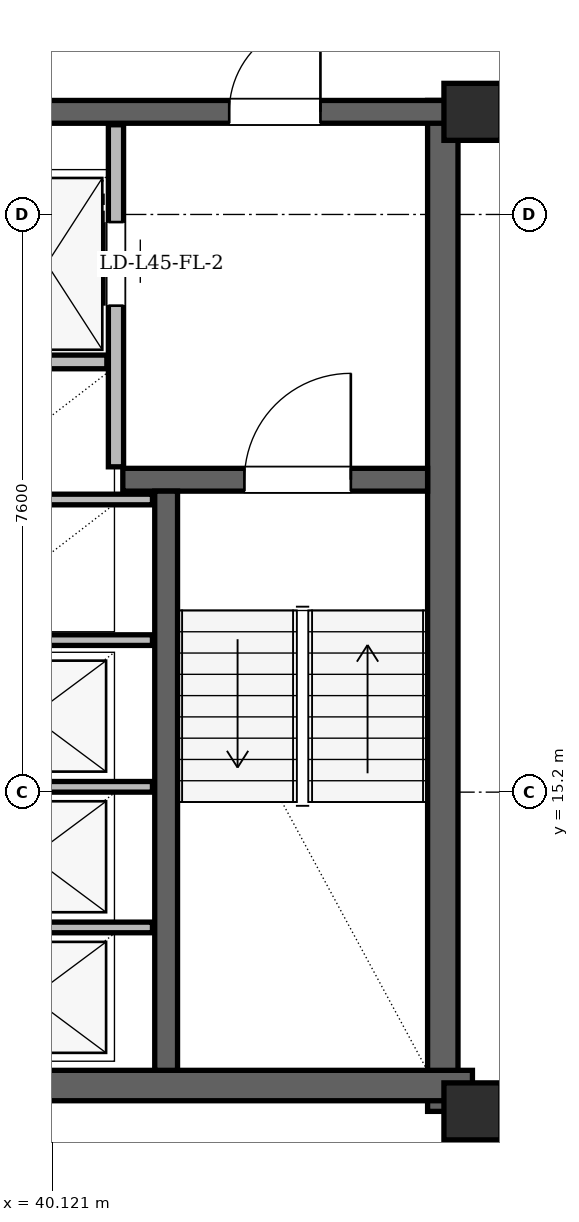
"""IFC4 building model, lengths in metres.
Left out: names, types, materials, properties, quantities, classifications, styles, units other than length and angle.
Written with IfcOpenShell. Run it as: python <this file> out.ifc"""

import sys

from ifc_helpers import new_model, si_unit, direction, frame, frame_2d, origin, origin_2d, place, context, subcontext, project, spatial, rectangle, hollow_rectangle, extrude, element, fill, save


model = new_model("IFC4")
c1 = context("Model", 3, precision=1e-05, world=origin(), true_north=direction((0.0, 1.0)))
c2 = subcontext(c1, "Body", "Model", "MODEL_VIEW")
j1 = project(units=[si_unit("LENGTHUNIT", "METRE"), si_unit("PLANEANGLEUNIT", "RADIAN")], contexts=[c1])
p1 = place(None, origin())
s1 = spatial("IfcSite", under=j1, at=p1, CompositionType="ELEMENT")
p2 = place(p1, origin())
s2 = spatial("IfcBuilding", under=s1, at=p2, CompositionType="ELEMENT")
p3 = place(p2, frame((0.0, 0.0, 171.0)))
s3 = spatial("IfcBuildingStorey", under=s2, at=p3, CompositionType="ELEMENT", Elevation=171.0)
for number, where, z_axis, x_axis in (
    (1, (45.65, 11.0, 0.0), (0.0, 0.0, 1.0), (1.0, 0.0, 0.0)),
    (2, (45.65, 24.15, 0.0), (0.0, 0.0, 1.0), (1.0, 0.0, 0.0)),
):
    element("IfcColumn", number, at=place(p3, frame(where, z_axis=z_axis, x_axis=x_axis)), inside=s3, PredefinedType="COLUMN", context=c2, shape_type="SweptSolid", body=[
        extrude(hollow_rectangle(XDim=0.75, YDim=0.75, WallThickness=0.06, at=origin_2d()), origin(), (0.0, 0.0, 1.0), 3.6),
    ])
p4 = place(p3, frame((45.26, 11.0, 0.0), z_axis=(0.0, 0.0, 1.0), x_axis=(0.0, 1.0, 0.0)))
e3 = element("IfcWall", 3, at=p4, inside=s3, PredefinedType="SHEAR", context=c2, shape_type="SweptSolid", body=[
    extrude(rectangle(XDim=13.3, YDim=0.4, at=frame_2d((6.65, 0.0))), origin(), (0.0, 0.0, 1.0), 3.38),
])
p5 = place(p3, frame((38.55, 11.34, 0.0), z_axis=(0.0, 0.0, 1.0), x_axis=(1.0, 0.0, 0.0)))
e4 = element("IfcWall", 4, at=p5, inside=s3, PredefinedType="SHEAR", context=c2, shape_type="SweptSolid", body=[
    extrude(rectangle(XDim=7.1, YDim=0.4, at=frame_2d((3.55, 0.0))), origin(), (0.0, 0.0, 1.0), 3.38),
])
p6 = place(p3, frame((29.65, 24.15, 0.0), z_axis=(0.0, 0.0, 1.0), x_axis=(1.0, 0.0, 0.0)))
e5 = element("IfcWall", 5, at=p6, inside=s3, PredefinedType="SHEAR", context=c2, shape_type="SweptSolid", body=[
    extrude(rectangle(XDim=15.7, YDim=0.3, at=frame_2d((7.85, 0.0))), origin(), (0.0, 0.0, 1.0), 3.38),
])
p7 = place(p6, frame((1.7, 0.0, 0.0)))
e6 = element("IfcOpeningElement", 6, at=p7, cuts=e5, PredefinedType="OPENING", context=c2, shape_type="SweptSolid", body=[
    extrude(rectangle(XDim=1.2, YDim=2.2, at=frame_2d((0.6, 1.1))), frame((0.0, 0.15, 0.0), z_axis=(0.0, -1.0, 0.0), x_axis=(1.0, 0.0, 0.0)), (0.0, 0.0, 1.0), 0.3),
])
p8 = place(p6, frame((12.8, 0.0, 0.0)))
e7 = element("IfcOpeningElement", 7, at=p8, cuts=e5, PredefinedType="OPENING", context=c2, shape_type="SweptSolid", body=[
    extrude(rectangle(XDim=1.2, YDim=2.2, at=frame_2d((0.6, 1.1))), frame((0.0, 0.15, 0.0), z_axis=(0.0, -1.0, 0.0), x_axis=(1.0, 0.0, 0.0)), (0.0, 0.0, 1.0), 0.3),
])
p9 = place(p6, frame((7.4, 0.0, 0.0)))
e8 = element("IfcOpeningElement", 8, at=p9, cuts=e5, PredefinedType="OPENING", context=c2, shape_type="SweptSolid", body=[
    extrude(rectangle(XDim=0.9, YDim=2.05, at=frame_2d((0.45, 1.025))), frame((0.0, 0.15, 0.0), z_axis=(0.0, -1.0, 0.0), x_axis=(1.0, 0.0, 0.0)), (0.0, 0.0, 1.0), 0.3),
])
p10 = place(p3, frame((41.05, 19.31, 0.0), z_axis=(0.0, 0.0, 1.0), x_axis=(1.0, 0.0, 0.0)))
e9 = element("IfcWall", 9, at=p10, inside=s3, PredefinedType="SHEAR", context=c2, shape_type="SweptSolid", body=[
    extrude(rectangle(XDim=4.01, YDim=0.3, at=frame_2d((2.005, 0.0))), origin(), (0.0, 0.0, 1.0), 3.38),
])
p11 = place(p10, frame((1.6, 0.0, 0.0)))
e10 = element("IfcOpeningElement", 10, at=p11, cuts=e9, PredefinedType="OPENING", context=c2, shape_type="SweptSolid", body=[
    extrude(rectangle(XDim=1.4, YDim=2.2, at=frame_2d((0.7, 1.1))), frame((0.0, 0.15, 0.0), z_axis=(0.0, -1.0, 0.0), x_axis=(1.0, 0.0, 0.0)), (0.0, 0.0, 1.0), 0.3),
])
p12 = place(p3, frame((41.62, 11.54, 0.0), z_axis=(0.0, 0.0, 1.0), x_axis=(0.0, 1.0, 0.0)))
e11 = element("IfcWall", 11, at=p12, inside=s3, PredefinedType="SHEAR", context=c2, shape_type="SweptSolid", body=[
    extrude(rectangle(XDim=7.62, YDim=0.3, at=frame_2d((3.81, 0.0))), origin(), (0.0, 0.0, 1.0), 3.38),
])
p13 = place(p3, frame((59.708, 12.214, 0.0), z_axis=(0.0, 0.0, 1.0), x_axis=(-0.499997229411, 0.866027003379, 0.0)))
e12 = element("IfcWall", 12, at=p13, inside=s3, PredefinedType="SOLIDWALL", context=c2, shape_type="SweptSolid", body=[
    extrude(rectangle(XDim=35.866, YDim=0.29, at=frame_2d((17.933, 0.0))), origin(), (0.0, 0.0, 1.0), 2.6),
])
p14 = place(p13, frame((8.034, 0.0, 0.0)))
e13 = element("IfcOpeningElement", 13, at=p14, cuts=e12, PredefinedType="OPENING", context=c2, shape_type="SweptSolid", body=[
    extrude(rectangle(XDim=1.5, YDim=2.2, at=frame_2d((0.75, 1.1))), frame((0.0, 0.145, 0.0), z_axis=(0.0, -1.0, 0.0), x_axis=(1.0, 0.0, 0.0)), (0.0, 0.0, 1.0), 0.29),
])
p15 = place(p13, frame((27.787, 0.0, 0.0)))
e14 = element("IfcOpeningElement", 14, at=p15, cuts=e12, PredefinedType="OPENING", context=c2, shape_type="SweptSolid", body=[
    extrude(rectangle(XDim=1.5, YDim=2.2, at=frame_2d((0.75, 1.1))), frame((0.0, 0.145, 0.0), z_axis=(0.0, -1.0, 0.0), x_axis=(1.0, 0.0, 0.0)), (0.0, 0.0, 1.0), 0.29),
])
p16 = place(p13, frame((33.023, 0.0, 0.85)))
e15 = element("IfcOpeningElement", 15, at=p16, cuts=e12, PredefinedType="OPENING", context=c2, shape_type="SweptSolid", body=[
    extrude(rectangle(XDim=1.2, YDim=1.48, at=frame_2d((0.6, 0.74))), frame((0.0, 0.145, 0.0), z_axis=(0.0, -1.0, 0.0), x_axis=(1.0, 0.0, 0.0)), (0.0, 0.0, 1.0), 0.29),
])
p17 = place(p13, frame((15.917, 0.0, 0.85)))
e16 = element("IfcOpeningElement", 16, at=p17, cuts=e12, PredefinedType="OPENING", context=c2, shape_type="SweptSolid", body=[
    extrude(rectangle(XDim=1.4, YDim=1.6, at=frame_2d((0.7, 0.8))), frame((0.0, 0.145, 0.0), z_axis=(0.0, -1.0, 0.0), x_axis=(1.0, 0.0, 0.0)), (0.0, 0.0, 1.0), 0.29),
])
p18 = place(p13, frame((21.416, 0.0, 0.85)))
e17 = element("IfcOpeningElement", 17, at=p18, cuts=e12, PredefinedType="OPENING", context=c2, shape_type="SweptSolid", body=[
    extrude(rectangle(XDim=2.5, YDim=1.64, at=frame_2d((1.25, 0.82))), frame((0.0, 0.145, 0.0), z_axis=(0.0, -1.0, 0.0), x_axis=(1.0, 0.0, 0.0)), (0.0, 0.0, 1.0), 0.29),
])
p19 = place(p3, frame((40.96, 19.48, 0.0), z_axis=(0.0, 0.0, 1.0), x_axis=(0.0, 1.0, 0.0)))
e18 = element("IfcWall", 18, at=p19, inside=s3, PredefinedType="PARTITIONING", context=c2, shape_type="SweptSolid", body=[
    extrude(rectangle(XDim=4.5, YDim=0.2, at=frame_2d((2.25, 0.0))), origin(), (0.0, 0.0, 1.0), 3.38),
])
p20 = place(p19, frame((2.12, 0.0, 0.0)))
e19 = element("IfcOpeningElement", 19, at=p20, cuts=e18, PredefinedType="OPENING", context=c2, shape_type="SweptSolid", body=[
    extrude(rectangle(XDim=1.1, YDim=2.2, at=frame_2d((0.55, 1.1))), frame((0.0, 0.1, 0.0), z_axis=(0.0, -1.0, 0.0), x_axis=(1.0, 0.0, 0.0)), (0.0, 0.0, 1.0), 0.2),
])
p21 = place(p3, frame((39.26, 20.86, 0.0), z_axis=(0.0, 0.0, 1.0), x_axis=(1.0, 0.0, 0.0)))
e20 = element("IfcWall", 20, at=p21, inside=s3, PredefinedType="PARTITIONING", context=c2, shape_type="SweptSolid", body=[
    extrude(rectangle(XDim=1.58, YDim=0.18, at=frame_2d((0.79, 0.0))), origin(), (0.0, 0.0, 1.0), 3.38),
])
for number, where, z_axis, x_axis in (
    (21, (38.78, 13.42, 0.0), (0.0, 0.0, 1.0), (1.0, 0.0, 0.0)),
    (22, (38.78, 15.27, 0.0), (0.0, 0.0, 1.0), (1.0, 0.0, 0.0)),
    (23, (38.78, 17.2, 0.0), (0.0, 0.0, 1.0), (1.0, 0.0, 0.0)),
    (24, (38.78, 19.05, 0.0), (0.0, 0.0, 1.0), (1.0, 0.0, 0.0)),
):
    element("IfcWall", number, at=place(p3, frame(where, z_axis=z_axis, x_axis=x_axis)), inside=s3, PredefinedType="PARTITIONING", context=c2, shape_type="SweptSolid", body=[
        extrude(rectangle(XDim=2.66, YDim=0.14, at=frame_2d((1.33, 0.0))), origin(), (0.0, 0.0, 1.0), 3.38),
    ])
p22 = place(p20, origin())
e25 = element("IfcDoor", 25, at=p22, inside=s3, OperationType="SLIDING_TO_RIGHT", PredefinedType="DOOR", context=c2, shape_type="SweptSolid", body=[
    extrude(rectangle(XDim=1.1, YDim=2.2, at=frame_2d((0.55, 1.1))), frame((0.0, 0.025, 0.0), z_axis=(0.0, -1.0, 0.0), x_axis=(1.0, 0.0, 0.0)), (0.0, 0.0, 1.0), 0.05),
])
fill(e19, e25)
p23 = place(p11, origin())
e26 = element("IfcDoor", 26, at=p23, inside=s3, OperationType="SINGLE_SWING_RIGHT", PredefinedType="DOOR", context=c2, shape_type="SweptSolid", body=[
    extrude(rectangle(XDim=1.4, YDim=2.2, at=frame_2d((0.7, 1.1))), frame((0.0, 0.025, 0.0), z_axis=(0.0, -1.0, 0.0), x_axis=(1.0, 0.0, 0.0)), (0.0, 0.0, 1.0), 0.05),
])
fill(e10, e26)
p24 = place(p8, origin())
e27 = element("IfcDoor", 27, at=p24, inside=s3, OperationType="SINGLE_SWING_RIGHT", PredefinedType="DOOR", context=c2, shape_type="SweptSolid", body=[
    extrude(rectangle(XDim=1.2, YDim=2.2, at=frame_2d((0.6, 1.1))), frame((0.0, 0.025, 0.0), z_axis=(0.0, -1.0, 0.0), x_axis=(1.0, 0.0, 0.0)), (0.0, 0.0, 1.0), 0.05),
])
fill(e7, e27)
save(model, sys.argv[1])
